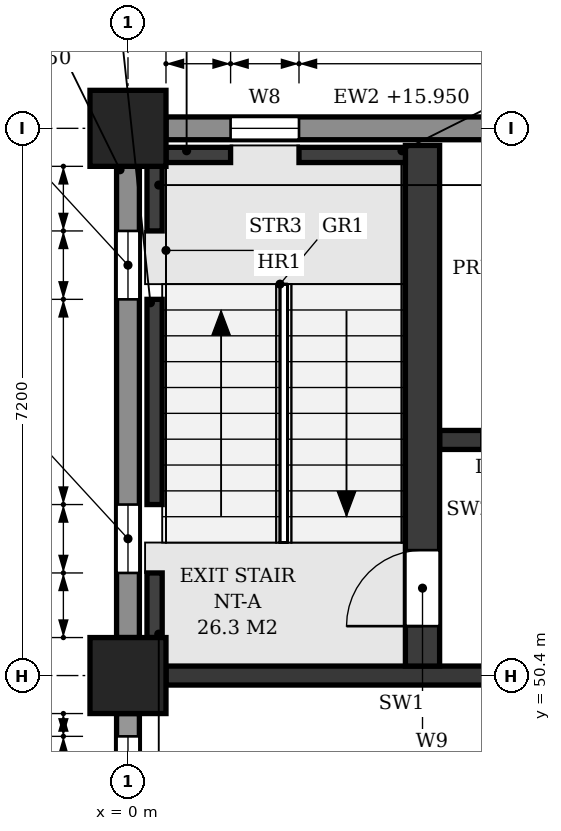
"""IFC4 building model, lengths in metres.
Left out: names, types, materials, properties, quantities, classifications, styles, units other than length and angle.
Written with IfcOpenShell. Run it as: python <this file> out.ifc"""

import sys

from ifc_helpers import new_model, si_unit, direction, frame, frame_2d, origin, origin_2d, place, context, subcontext, project, spatial, polyline, rectangle, outline, extrude, element, fill, save


model = new_model("IFC4")
c1 = context("Model", 3, precision=1e-05, world=origin(), true_north=direction((0.0, 1.0)))
c2 = subcontext(c1, "Body", "Model", "MODEL_VIEW")
j1 = project(units=[si_unit("LENGTHUNIT", "METRE"), si_unit("PLANEANGLEUNIT", "RADIAN")], contexts=[c1])
p1 = place(None, origin())
s1 = spatial("IfcSite", under=j1, at=p1, CompositionType="ELEMENT")
p2 = place(p1, origin())
s2 = spatial("IfcBuilding", under=s1, at=p2, CompositionType="ELEMENT")
p3 = place(p2, frame((0.0, 0.0, 11.4)))
s3 = spatial("IfcBuildingStorey", under=s2, at=p3, CompositionType="ELEMENT", Elevation=11.4)
for number, where, z_axis, x_axis in (
    (1, (0.0, 50.4, 0.0), (0.0, 0.0, 1.0), (1.0, 0.0, 0.0)),
    (2, (0.0, 57.6, 0.0), (0.0, 0.0, 1.0), (1.0, 0.0, 0.0)),
):
    element("IfcColumn", number, at=place(p3, frame(where, z_axis=z_axis, x_axis=x_axis)), inside=s3, PredefinedType="COLUMN", context=c2, shape_type="SweptSolid", body=[
        extrude(rectangle(XDim=1.0, YDim=1.0, at=origin_2d()), origin(), (0.0, 0.0, 1.0), 5.4),
    ])
p4 = place(p3, frame((0.0, 43.7, 0.0), z_axis=(0.0, 0.0, 1.0), x_axis=(0.0, 1.0, 0.0)))
e3 = element("IfcWall", 3, at=p4, inside=s3, PredefinedType="STANDARD", context=c2, shape_type="SweptSolid", body=[
    extrude(rectangle(XDim=6.2, YDim=0.3, at=frame_2d((3.1, 0.0))), origin(), (0.0, 0.0, 1.0), 4.55),
])
p5 = place(p4, frame((0.3, 0.0, 0.9)))
e4 = element("IfcOpeningElement", 4, at=p5, cuts=e3, PredefinedType="OPENING", context=c2, shape_type="SweptSolid", body=[
    extrude(outline(polyline([(0.0, 0.0), (0.85, 0.0), (0.85, 2.65), (0.425, 3.1), (0.0, 2.65), (0.0, 0.0)])), frame((0.0, 0.16, 0.0), z_axis=(0.0, -1.0, 0.0), x_axis=(1.0, 0.0, 0.0)), (0.0, 0.0, 1.0), 0.32),
])
p6 = place(p4, frame((1.45, 0.0, 0.9)))
e5 = element("IfcOpeningElement", 5, at=p6, cuts=e3, PredefinedType="OPENING", context=c2, shape_type="SweptSolid", body=[
    extrude(outline(polyline([(0.0, 0.0), (0.85, 0.0), (0.85, 2.65), (0.425, 3.1), (0.0, 2.65), (0.0, 0.0)])), frame((0.0, 0.16, 0.0), z_axis=(0.0, -1.0, 0.0), x_axis=(1.0, 0.0, 0.0)), (0.0, 0.0, 1.0), 0.32),
])
p7 = place(p4, frame((3.9, 0.0, 0.9)))
e6 = element("IfcOpeningElement", 6, at=p7, cuts=e3, PredefinedType="OPENING", context=c2, shape_type="SweptSolid", body=[
    extrude(outline(polyline([(0.0, 0.0), (0.85, 0.0), (0.85, 2.65), (0.425, 3.1), (0.0, 2.65), (0.0, 0.0)])), frame((0.0, 0.16, 0.0), z_axis=(0.0, -1.0, 0.0), x_axis=(1.0, 0.0, 0.0)), (0.0, 0.0, 1.0), 0.32),
])
p8 = place(p4, frame((5.05, 0.0, 0.9)))
e7 = element("IfcOpeningElement", 7, at=p8, cuts=e3, PredefinedType="OPENING", context=c2, shape_type="SweptSolid", body=[
    extrude(outline(polyline([(0.0, 0.0), (0.85, 0.0), (0.85, 2.65), (0.425, 3.1), (0.0, 2.65), (0.0, 0.0)])), frame((0.0, 0.16, 0.0), z_axis=(0.0, -1.0, 0.0), x_axis=(1.0, 0.0, 0.0)), (0.0, 0.0, 1.0), 0.32),
])
p9 = place(p3, frame((0.0, 50.9, 0.0), z_axis=(0.0, 0.0, 1.0), x_axis=(0.0, 1.0, 0.0)))
e8 = element("IfcWall", 8, at=p9, inside=s3, PredefinedType="STANDARD", context=c2, shape_type="SweptSolid", body=[
    extrude(rectangle(XDim=6.2, YDim=0.3, at=frame_2d((3.1, 0.0))), origin(), (0.0, 0.0, 1.0), 4.55),
])
p10 = place(p9, frame((0.85, 0.0, 0.9)))
e9 = element("IfcOpeningElement", 9, at=p10, cuts=e8, PredefinedType="OPENING", context=c2, shape_type="SweptSolid", body=[
    extrude(outline(polyline([(0.0, 0.0), (0.9, 0.0), (0.9, 2.65), (0.45, 3.1), (0.0, 2.65), (0.0, 0.0)])), frame((0.0, 0.16, 0.0), z_axis=(0.0, -1.0, 0.0), x_axis=(1.0, 0.0, 0.0)), (0.0, 0.0, 1.0), 0.32),
])
p11 = place(p9, frame((4.45, 0.0, 0.9)))
e10 = element("IfcOpeningElement", 10, at=p11, cuts=e8, PredefinedType="OPENING", context=c2, shape_type="SweptSolid", body=[
    extrude(outline(polyline([(0.0, 0.0), (0.9, 0.0), (0.9, 2.65), (0.45, 3.1), (0.0, 2.65), (0.0, 0.0)])), frame((0.0, 0.16, 0.0), z_axis=(0.0, -1.0, 0.0), x_axis=(1.0, 0.0, 0.0)), (0.0, 0.0, 1.0), 0.32),
])
p12 = place(p3, frame((6.7, 57.6, 0.0), z_axis=(0.0, 0.0, 1.0), x_axis=(-1.0, 0.0, 0.0)))
e11 = element("IfcWall", 11, at=p12, inside=s3, PredefinedType="STANDARD", context=c2, shape_type="SweptSolid", body=[
    extrude(rectangle(XDim=6.2, YDim=0.3, at=frame_2d((3.1, 0.0))), origin(), (0.0, 0.0, 1.0), 4.55),
])
p13 = place(p12, frame((4.45, 0.0, 0.9)))
e12 = element("IfcOpeningElement", 12, at=p13, cuts=e11, PredefinedType="OPENING", context=c2, shape_type="SweptSolid", body=[
    extrude(outline(polyline([(0.0, 0.0), (0.9, 0.0), (0.9, 2.65), (0.45, 3.1), (0.0, 2.65), (0.0, 0.0)])), frame((0.0, 0.16, 0.0), z_axis=(0.0, -1.0, 0.0), x_axis=(1.0, 0.0, 0.0)), (0.0, 0.0, 1.0), 0.32),
])
p14 = place(p3, frame((0.5, 50.4, 0.0), z_axis=(0.0, 0.0, 1.0), x_axis=(1.0, 0.0, 0.0)))
e13 = element("IfcWall", 13, at=p14, inside=s3, PredefinedType="SHEAR", context=c2, shape_type="SweptSolid", body=[
    extrude(rectangle(XDim=6.2, YDim=0.25, at=frame_2d((3.1, 0.0))), origin(), (0.0, 0.0, 1.0), 4.4),
])
p15 = place(p14, frame((4.75, 0.0, 0.0)))
e14 = element("IfcOpeningElement", 14, at=p15, cuts=e13, PredefinedType="OPENING", context=c2, shape_type="SweptSolid", body=[
    extrude(rectangle(XDim=1.1, YDim=2.1, at=frame_2d((0.55, 1.05))), frame((0.0, 0.135, 0.0), z_axis=(0.0, -1.0, 0.0), x_axis=(1.0, 0.0, 0.0)), (0.0, 0.0, 1.0), 0.27),
])
p16 = place(p3, frame((0.35, 50.9, -0.25), z_axis=(0.0, 0.0, 1.0), x_axis=(0.0, 1.0, 0.0)))
e15 = element("IfcWall", 15, at=p16, inside=s3, PredefinedType="SHEAR", context=c2, shape_type="SweptSolid", body=[
    extrude(rectangle(XDim=0.85, YDim=0.2, at=frame_2d((0.425, 0.0))), origin(), (0.0, 0.0, 1.0), 5.4),
])
p17 = place(p3, frame((0.35, 52.65, -0.25), z_axis=(0.0, 0.0, 1.0), x_axis=(0.0, 1.0, 0.0)))
e16 = element("IfcWall", 16, at=p17, inside=s3, PredefinedType="SHEAR", context=c2, shape_type="SweptSolid", body=[
    extrude(rectangle(XDim=2.7, YDim=0.2, at=frame_2d((1.35, 0.0))), origin(), (0.0, 0.0, 1.0), 5.4),
])
for number, where, z_axis, x_axis in (
    (17, (0.35, 56.25, -0.25), (0.0, 0.0, 1.0), (0.0, 1.0, 0.0)),
    (18, (0.5, 57.25, -0.25), (0.0, 0.0, 1.0), (1.0, 0.0, 0.0)),
):
    element("IfcWall", number, at=place(p3, frame(where, z_axis=z_axis, x_axis=x_axis)), inside=s3, PredefinedType="SHEAR", context=c2, shape_type="SweptSolid", body=[
        extrude(rectangle(XDim=0.85, YDim=0.2, at=frame_2d((0.425, 0.0))), origin(), (0.0, 0.0, 1.0), 5.4),
    ])
p18 = place(p3, frame((2.25, 57.25, -0.25), z_axis=(0.0, 0.0, 1.0), x_axis=(1.0, 0.0, 0.0)))
e19 = element("IfcWall", 19, at=p18, inside=s3, PredefinedType="SHEAR", context=c2, shape_type="SweptSolid", body=[
    extrude(rectangle(XDim=1.4, YDim=0.2, at=frame_2d((0.7, 0.0))), origin(), (0.0, 0.0, 1.0), 5.4),
])
p19 = place(p3, frame((3.875, 50.525, 0.0), z_axis=(0.0, 0.0, 1.0), x_axis=(0.0, 1.0, 0.0)))
e20 = element("IfcWall", 20, at=p19, inside=s3, PredefinedType="SHEAR", context=c2, shape_type="SweptSolid", body=[
    extrude(rectangle(XDim=6.85, YDim=0.45, at=frame_2d((3.425, 0.0))), origin(), (0.0, 0.0, 1.0), 5.15),
])
p20 = place(p19, frame((0.525, 0.0, 0.0)))
e21 = element("IfcOpeningElement", 21, at=p20, cuts=e20, PredefinedType="OPENING", context=c2, shape_type="SweptSolid", body=[
    extrude(rectangle(XDim=1.0, YDim=2.1, at=frame_2d((0.5, 1.05))), frame((0.0, 0.235, 0.0), z_axis=(0.0, -1.0, 0.0), x_axis=(1.0, 0.0, 0.0)), (0.0, 0.0, 1.0), 0.47),
])
p21 = place(p3, frame((4.1, 53.5, 0.0), z_axis=(0.0, 0.0, 1.0), x_axis=(1.0, 0.0, 0.0)))
e22 = element("IfcWall", 22, at=p21, inside=s3, PredefinedType="SHEAR", context=c2, shape_type="SweptSolid", body=[
    extrude(rectangle(XDim=2.975, YDim=0.25, at=frame_2d((1.487, 0.0))), origin(), (0.0, 0.0, 1.0), 5.15),
])
p22 = place(p21, frame((0.55, 0.0, 0.0)))
e23 = element("IfcOpeningElement", 23, at=p22, cuts=e22, PredefinedType="OPENING", context=c2, shape_type="SweptSolid", body=[
    extrude(rectangle(XDim=0.9, YDim=2.1, at=frame_2d((0.45, 1.05))), frame((0.0, 0.135, 0.0), z_axis=(0.0, -1.0, 0.0), x_axis=(1.0, 0.0, 0.0)), (0.0, 0.0, 1.0), 0.27),
])
p23 = place(p13, origin())
e24 = element("IfcWindow", 24, at=p23, inside=s3, PartitioningType="SINGLE_PANEL", PredefinedType="WINDOW", context=c2, shape_type="SweptSolid", body=[
    extrude(outline(polyline([(0.0, 0.0), (0.9, 0.0), (0.9, 2.65), (0.45, 3.1), (0.0, 2.65), (0.0, 0.0)])), frame((0.0, 0.03, 0.0), z_axis=(0.0, -1.0, 0.0), x_axis=(1.0, 0.0, 0.0)), (0.0, 0.0, 1.0), 0.06),
])
fill(e12, e24)
p24 = place(p8, origin())
e25 = element("IfcWindow", 25, at=p24, inside=s3, PartitioningType="SINGLE_PANEL", PredefinedType="WINDOW", context=c2, shape_type="SweptSolid", body=[
    extrude(outline(polyline([(0.0, 0.0), (0.85, 0.0), (0.85, 2.65), (0.425, 3.1), (0.0, 2.65), (0.0, 0.0)])), frame((0.0, 0.03, 0.0), z_axis=(0.0, -1.0, 0.0), x_axis=(1.0, 0.0, 0.0)), (0.0, 0.0, 1.0), 0.06),
])
fill(e7, e25)
p25 = place(p10, origin())
e26 = element("IfcWindow", 26, at=p25, inside=s3, PartitioningType="SINGLE_PANEL", PredefinedType="WINDOW", context=c2, shape_type="SweptSolid", body=[
    extrude(outline(polyline([(0.0, 0.0), (0.9, 0.0), (0.9, 2.65), (0.45, 3.1), (0.0, 2.65), (0.0, 0.0)])), frame((0.0, 0.03, 0.0), z_axis=(0.0, -1.0, 0.0), x_axis=(1.0, 0.0, 0.0)), (0.0, 0.0, 1.0), 0.06),
])
fill(e9, e26)
p26 = place(p11, origin())
e27 = element("IfcWindow", 27, at=p26, inside=s3, PartitioningType="SINGLE_PANEL", PredefinedType="WINDOW", context=c2, shape_type="SweptSolid", body=[
    extrude(outline(polyline([(0.0, 0.0), (0.9, 0.0), (0.9, 2.65), (0.45, 3.1), (0.0, 2.65), (0.0, 0.0)])), frame((0.0, 0.03, 0.0), z_axis=(0.0, -1.0, 0.0), x_axis=(1.0, 0.0, 0.0)), (0.0, 0.0, 1.0), 0.06),
])
fill(e10, e27)
p27 = place(p20, origin())
e28 = element("IfcDoor", 28, at=p27, inside=s3, OperationType="SINGLE_SWING_LEFT", PredefinedType="DOOR", context=c2, shape_type="SweptSolid", body=[
    extrude(rectangle(XDim=1.0, YDim=2.1, at=frame_2d((0.5, 1.05))), frame((0.0, 0.025, 0.0), z_axis=(0.0, -1.0, 0.0), x_axis=(1.0, 0.0, 0.0)), (0.0, 0.0, 1.0), 0.05),
])
fill(e21, e28)
save(model, sys.argv[1])
